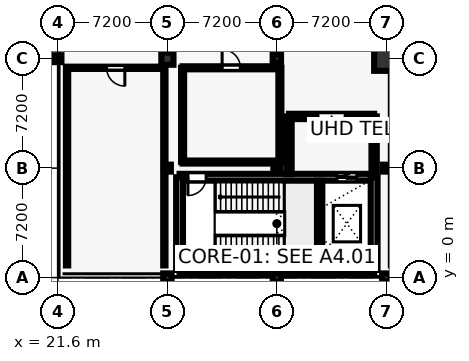
"""IFC4 building model, lengths in metres.
Left out: names, types, materials, properties, quantities, classifications, styles, units other than length and angle.
Written with IfcOpenShell. Run it as: python <this file> out.ifc"""

import sys

from ifc_helpers import new_model, si_unit, direction, frame, frame_2d, origin, origin_2d, place, context, subcontext, project, spatial, rectangle, circle, hollow_circle, extrude, element, fill, save


model = new_model("IFC4")
c1 = context("Model", 3, precision=1e-05, world=origin(), true_north=direction((0.0, 1.0)))
c2 = subcontext(c1, "Body", "Model", "MODEL_VIEW")
j1 = project(units=[si_unit("LENGTHUNIT", "METRE"), si_unit("PLANEANGLEUNIT", "RADIAN")], contexts=[c1])
p1 = place(None, origin())
s1 = spatial("IfcSite", under=j1, at=p1, CompositionType="ELEMENT")
p2 = place(p1, origin())
s2 = spatial("IfcBuilding", under=s1, at=p2, CompositionType="ELEMENT")
p3 = place(p2, frame((0.0, 0.0, 18.6)))
s3 = spatial("IfcBuildingStorey", under=s2, at=p3, CompositionType="ELEMENT", Elevation=18.6)
p4 = place(p3, frame((21.6, 14.4, 0.0), z_axis=(0.0, 0.0, 1.0), x_axis=(1.0, 0.0, 0.0)))
e1 = element("IfcColumn", 1, at=p4, inside=s3, PredefinedType="COLUMN", context=c2, shape_type="SweptSolid", body=[
    extrude(hollow_circle(Radius=0.229, WallThickness=0.02, at=origin_2d()), origin(), (0.0, 0.0, 1.0), 4.4),
])
p5 = place(p3, frame((28.8, 0.0, 0.0), z_axis=(0.0, 0.0, 1.0), x_axis=(1.0, 0.0, 0.0)))
e2 = element("IfcColumn", 2, at=p5, inside=s3, PredefinedType="COLUMN", context=c2, shape_type="SweptSolid", body=[
    extrude(rectangle(XDim=0.55, YDim=0.55, at=origin_2d()), origin(), (0.0, 0.0, 1.0), 4.4),
])
p6 = place(p3, frame((28.8, 7.2, 0.0), z_axis=(0.0, 0.0, 1.0), x_axis=(1.0, 0.0, 0.0)))
e3 = element("IfcColumn", 3, at=p6, inside=s3, PredefinedType="COLUMN", context=c2, shape_type="SweptSolid", body=[
    extrude(hollow_circle(Radius=0.229, WallThickness=0.02, at=origin_2d()), origin(), (0.0, 0.0, 1.0), 4.4),
])
p7 = place(p3, frame((28.8, 14.4, 0.0), z_axis=(0.0, 0.0, 1.0), x_axis=(1.0, 0.0, 0.0)))
e4 = element("IfcColumn", 4, at=p7, inside=s3, PredefinedType="COLUMN", context=c2, shape_type="SweptSolid", body=[
    extrude(circle(Radius=0.4, at=origin_2d()), origin(), (0.0, 0.0, 1.0), 4.4),
])
p8 = place(p3, frame((36.0, 0.0, 0.0), z_axis=(0.0, 0.0, 1.0), x_axis=(1.0, 0.0, 0.0)))
e5 = element("IfcColumn", 5, at=p8, inside=s3, PredefinedType="COLUMN", context=c2, shape_type="SweptSolid", body=[
    extrude(rectangle(XDim=0.55, YDim=0.55, at=origin_2d()), origin(), (0.0, 0.0, 1.0), 4.4),
])
p9 = place(p3, frame((36.0, 7.2, 0.0), z_axis=(0.0, 0.0, 1.0), x_axis=(1.0, 0.0, 0.0)))
e6 = element("IfcColumn", 6, at=p9, inside=s3, PredefinedType="COLUMN", context=c2, shape_type="SweptSolid", body=[
    extrude(hollow_circle(Radius=0.229, WallThickness=0.02, at=origin_2d()), origin(), (0.0, 0.0, 1.0), 4.4),
])
for number, where, z_axis, x_axis in (
    (7, (36.0, 14.4, 0.0), (0.0, 0.0, 1.0), (1.0, 0.0, 0.0)),
    (8, (43.2, 0.0, 0.0), (0.0, 0.0, 1.0), (1.0, 0.0, 0.0)),
):
    element("IfcColumn", number, at=place(p3, frame(where, z_axis=z_axis, x_axis=x_axis)), inside=s3, PredefinedType="COLUMN", context=c2, shape_type="SweptSolid", body=[
        extrude(rectangle(XDim=0.55, YDim=0.55, at=origin_2d()), origin(), (0.0, 0.0, 1.0), 4.4),
    ])
p10 = place(p3, frame((43.2, 7.2, 0.0), z_axis=(0.0, 0.0, 1.0), x_axis=(1.0, 0.0, 0.0)))
e9 = element("IfcColumn", 9, at=p10, inside=s3, PredefinedType="COLUMN", context=c2, shape_type="SweptSolid", body=[
    extrude(hollow_circle(Radius=0.229, WallThickness=0.02, at=origin_2d()), origin(), (0.0, 0.0, 1.0), 4.4),
])
p11 = place(p3, frame((43.2, 14.4, 0.0), z_axis=(0.0, 0.0, 1.0), x_axis=(1.0, 0.0, 0.0)))
e10 = element("IfcColumn", 10, at=p11, inside=s3, PredefinedType="COLUMN", context=c2, shape_type="SweptSolid", body=[
    extrude(circle(Radius=0.8, at=origin_2d()), origin(), (0.0, 0.0, 1.0), 4.4),
])
p12 = place(p3, frame((29.6, 0.5, 0.0), z_axis=(0.0, 0.0, 1.0), x_axis=(1.0, 0.0, 0.0)))
e11 = element("IfcWall", 11, at=p12, inside=s3, PredefinedType="SHEAR", context=c2, shape_type="SweptSolid", body=[
    extrude(rectangle(XDim=12.8, YDim=0.45, at=frame_2d((6.4, 0.0))), origin(), (0.0, 0.0, 1.0), 4.15),
])
p13 = place(p3, frame((29.6, 6.6, 0.0), z_axis=(0.0, 0.0, 1.0), x_axis=(1.0, 0.0, 0.0)))
e12 = element("IfcWall", 12, at=p13, inside=s3, PredefinedType="SHEAR", context=c2, shape_type="SweptSolid", body=[
    extrude(rectangle(XDim=12.8, YDim=0.45, at=frame_2d((6.4, 0.0))), origin(), (0.0, 0.0, 1.0), 4.15),
])
p14 = place(p13, frame((0.55, 0.0, 0.0)))
e13 = element("IfcOpeningElement", 13, at=p14, cuts=e12, PredefinedType="OPENING", context=c2, shape_type="SweptSolid", body=[
    extrude(rectangle(XDim=1.2, YDim=2.25, at=frame_2d((0.6, 1.125))), frame((0.0, 0.235, 0.0), z_axis=(0.0, -1.0, 0.0), x_axis=(1.0, 0.0, 0.0)), (0.0, 0.0, 1.0), 0.47),
])
p15 = place(p13, frame((10.358, 0.0, 0.0)))
e14 = element("IfcOpeningElement", 14, at=p15, cuts=e12, PredefinedType="OPENING", context=c2, shape_type="SweptSolid", body=[
    extrude(rectangle(XDim=1.3, YDim=2.25, at=frame_2d((0.65, 1.125))), frame((0.0, 0.235, 0.0), z_axis=(0.0, -1.0, 0.0), x_axis=(1.0, 0.0, 0.0)), (0.0, 0.0, 1.0), 0.47),
])
for number, where, z_axis, x_axis in (
    (15, (29.6, 0.5, 0.0), (0.0, 0.0, 1.0), (0.0, 1.0, 0.0)),
    (16, (42.4, 0.5, 0.0), (0.0, 0.0, 1.0), (0.0, 1.0, 0.0)),
):
    element("IfcWall", number, at=place(p3, frame(where, z_axis=z_axis, x_axis=x_axis)), inside=s3, PredefinedType="SHEAR", context=c2, shape_type="SweptSolid", body=[
        extrude(rectangle(XDim=6.1, YDim=0.45, at=frame_2d((3.05, 0.0))), origin(), (0.0, 0.0, 1.0), 4.15),
    ])
p16 = place(p3, frame((38.816, 0.725, 0.0), z_axis=(0.0, 0.0, 1.0), x_axis=(0.0, 1.0, 0.0)))
e17 = element("IfcWall", 17, at=p16, inside=s3, PredefinedType="SHEAR", context=c2, shape_type="SweptSolid", body=[
    extrude(rectangle(XDim=5.65, YDim=0.35, at=frame_2d((2.825, 0.0))), origin(), (0.0, 0.0, 1.0), 4.15),
])
p17 = place(p3, frame((42.4, 6.8, 0.0), z_axis=(0.0, 0.0, 1.0), x_axis=(0.0, 1.0, 0.0)))
e18 = element("IfcWall", 18, at=p17, inside=s3, PredefinedType="SHEAR", context=c2, shape_type="SweptSolid", body=[
    extrude(rectangle(XDim=3.8, YDim=0.35, at=frame_2d((1.9, 0.0))), origin(), (0.0, 0.0, 1.0), 3.21),
])
p18 = place(p3, frame((42.4, 10.6, 0.0), z_axis=(0.0, 0.0, 1.0), x_axis=(-1.0, 0.0, 0.0)))
e19 = element("IfcWall", 19, at=p18, inside=s3, PredefinedType="SHEAR", context=c2, shape_type="SweptSolid", body=[
    extrude(rectangle(XDim=5.6, YDim=0.35, at=frame_2d((2.8, 0.0))), origin(), (0.0, 0.0, 1.0), 3.21),
])
p19 = place(p18, frame((1.9, 0.0, 0.0)))
e20 = element("IfcOpeningElement", 20, at=p19, cuts=e19, PredefinedType="OPENING", context=c2, shape_type="SweptSolid", body=[
    extrude(rectangle(XDim=1.8, YDim=2.3, at=frame_2d((0.9, 1.15))), frame((0.0, 0.185, 0.0), z_axis=(0.0, -1.0, 0.0), x_axis=(1.0, 0.0, 0.0)), (0.0, 0.0, 1.0), 0.37),
])
p20 = place(p3, frame((36.8, 10.6, 0.0), z_axis=(0.0, 0.0, 1.0), x_axis=(0.0, -1.0, 0.0)))
e21 = element("IfcWall", 21, at=p20, inside=s3, PredefinedType="SHEAR", context=c2, shape_type="SweptSolid", body=[
    extrude(rectangle(XDim=3.8, YDim=0.35, at=frame_2d((1.9, 0.0))), origin(), (0.0, 0.0, 1.0), 3.21),
])
p21 = place(p3, frame((28.6, 0.8, 0.0), z_axis=(0.0, 0.0, 1.0), x_axis=(0.0, 1.0, 0.0)))
e22 = element("IfcWall", 22, at=p21, inside=s3, PredefinedType="PARTITIONING", context=c2, shape_type="SweptSolid", body=[
    extrude(rectangle(XDim=13.0, YDim=0.15, at=frame_2d((6.5, 0.0))), origin(), (0.0, 0.0, 1.0), 3.21),
])
p22 = place(p3, frame((28.6, 13.8, 0.0), z_axis=(0.0, 0.0, 1.0), x_axis=(-1.0, 0.0, 0.0)))
e23 = element("IfcWall", 23, at=p22, inside=s3, PredefinedType="PARTITIONING", context=c2, shape_type="SweptSolid", body=[
    extrude(rectangle(XDim=6.4, YDim=0.15, at=frame_2d((3.2, 0.0))), origin(), (0.0, 0.0, 1.0), 3.21),
])
p23 = place(p22, frame((2.6, 0.0, 0.0)))
e24 = element("IfcOpeningElement", 24, at=p23, cuts=e23, PredefinedType="OPENING", context=c2, shape_type="SweptSolid", body=[
    extrude(rectangle(XDim=1.2, YDim=2.2, at=frame_2d((0.6, 1.1))), frame((0.0, 0.085, 0.0), z_axis=(0.0, -1.0, 0.0), x_axis=(1.0, 0.0, 0.0)), (0.0, 0.0, 1.0), 0.17),
])
p24 = place(p3, frame((22.2, 13.8, 0.0), z_axis=(0.0, 0.0, 1.0), x_axis=(0.0, -1.0, 0.0)))
e25 = element("IfcWall", 25, at=p24, inside=s3, PredefinedType="PARTITIONING", context=c2, shape_type="SweptSolid", body=[
    extrude(rectangle(XDim=13.0, YDim=0.15, at=frame_2d((6.5, 0.0))), origin(), (0.0, 0.0, 1.0), 3.21),
])
p25 = place(p3, frame((29.8, 7.6, 0.0), z_axis=(0.0, 0.0, 1.0), x_axis=(1.0, 0.0, 0.0)))
e26 = element("IfcWall", 26, at=p25, inside=s3, PredefinedType="PARTITIONING", context=c2, shape_type="SweptSolid", body=[
    extrude(rectangle(XDim=6.4, YDim=0.2, at=frame_2d((3.2, 0.0))), origin(), (0.0, 0.0, 1.0), 3.21),
])
p26 = place(p3, frame((36.2, 7.6, 0.0), z_axis=(0.0, 0.0, 1.0), x_axis=(0.0, 1.0, 0.0)))
e27 = element("IfcWall", 27, at=p26, inside=s3, PredefinedType="PARTITIONING", context=c2, shape_type="SweptSolid", body=[
    extrude(rectangle(XDim=6.2, YDim=0.2, at=frame_2d((3.1, 0.0))), origin(), (0.0, 0.0, 1.0), 3.21),
])
p27 = place(p3, frame((36.2, 13.8, 0.0), z_axis=(0.0, 0.0, 1.0), x_axis=(-1.0, 0.0, 0.0)))
e28 = element("IfcWall", 28, at=p27, inside=s3, PredefinedType="PARTITIONING", context=c2, shape_type="SweptSolid", body=[
    extrude(rectangle(XDim=6.4, YDim=0.2, at=frame_2d((3.2, 0.0))), origin(), (0.0, 0.0, 1.0), 3.21),
])
p28 = place(p27, frame((2.6, 0.0, 0.0)))
e29 = element("IfcOpeningElement", 29, at=p28, cuts=e28, PredefinedType="OPENING", context=c2, shape_type="SweptSolid", body=[
    extrude(rectangle(XDim=1.2, YDim=2.25, at=frame_2d((0.6, 1.125))), frame((0.0, 0.11, 0.0), z_axis=(0.0, -1.0, 0.0), x_axis=(1.0, 0.0, 0.0)), (0.0, 0.0, 1.0), 0.22),
])
p29 = place(p3, frame((29.8, 13.8, 0.0), z_axis=(0.0, 0.0, 1.0), x_axis=(0.0, -1.0, 0.0)))
e30 = element("IfcWall", 30, at=p29, inside=s3, PredefinedType="PARTITIONING", context=c2, shape_type="SweptSolid", body=[
    extrude(rectangle(XDim=6.2, YDim=0.2, at=frame_2d((3.1, 0.0))), origin(), (0.0, 0.0, 1.0), 3.21),
])
p30 = place(p14, frame((1.2, 0.0, 0.0), z_axis=(0.0, 0.0, 1.0), x_axis=(-1.0, 0.0, 0.0)))
e31 = element("IfcDoor", 31, at=p30, inside=s3, OperationType="SINGLE_SWING_LEFT", PredefinedType="DOOR", context=c2, shape_type="SweptSolid", body=[
    extrude(rectangle(XDim=1.2, YDim=2.25, at=frame_2d((0.6, 1.125))), frame((0.0, 0.025, 0.0), z_axis=(0.0, -1.0, 0.0), x_axis=(1.0, 0.0, 0.0)), (0.0, 0.0, 1.0), 0.05),
])
fill(e13, e31)
p31 = place(p15, origin())
e32 = element("IfcDoor", 32, at=p31, inside=s3, OperationType="SLIDING_TO_RIGHT", PredefinedType="DOOR", context=c2, shape_type="SweptSolid", body=[
    extrude(rectangle(XDim=1.3, YDim=2.25, at=frame_2d((0.65, 1.125))), frame((0.0, 0.025, 0.0), z_axis=(0.0, -1.0, 0.0), x_axis=(1.0, 0.0, 0.0)), (0.0, 0.0, 1.0), 0.05),
])
fill(e14, e32)
p32 = place(p19, origin())
e33 = element("IfcDoor", 33, at=p32, inside=s3, OperationType="DOUBLE_DOOR_SINGLE_SWING", PredefinedType="DOOR", context=c2, shape_type="SweptSolid", body=[
    extrude(rectangle(XDim=1.8, YDim=2.3, at=frame_2d((0.9, 1.15))), frame((0.0, 0.025, 0.0), z_axis=(0.0, -1.0, 0.0), x_axis=(1.0, 0.0, 0.0)), (0.0, 0.0, 1.0), 0.05),
])
fill(e20, e33)
p33 = place(p23, origin())
e34 = element("IfcDoor", 34, at=p33, inside=s3, OperationType="SINGLE_SWING_LEFT", PredefinedType="DOOR", context=c2, shape_type="SweptSolid", body=[
    extrude(rectangle(XDim=1.2, YDim=2.2, at=frame_2d((0.6, 1.1))), frame((0.0, 0.025, 0.0), z_axis=(0.0, -1.0, 0.0), x_axis=(1.0, 0.0, 0.0)), (0.0, 0.0, 1.0), 0.05),
])
fill(e24, e34)
p34 = place(p28, frame((1.2, 0.0, 0.0), z_axis=(0.0, 0.0, 1.0), x_axis=(-1.0, 0.0, 0.0)))
e35 = element("IfcDoor", 35, at=p34, inside=s3, OperationType="SINGLE_SWING_RIGHT", PredefinedType="DOOR", context=c2, shape_type="SweptSolid", body=[
    extrude(rectangle(XDim=1.2, YDim=2.25, at=frame_2d((0.6, 1.125))), frame((0.0, 0.025, 0.0), z_axis=(0.0, -1.0, 0.0), x_axis=(1.0, 0.0, 0.0)), (0.0, 0.0, 1.0), 0.05),
])
fill(e29, e35)
save(model, sys.argv[1])
